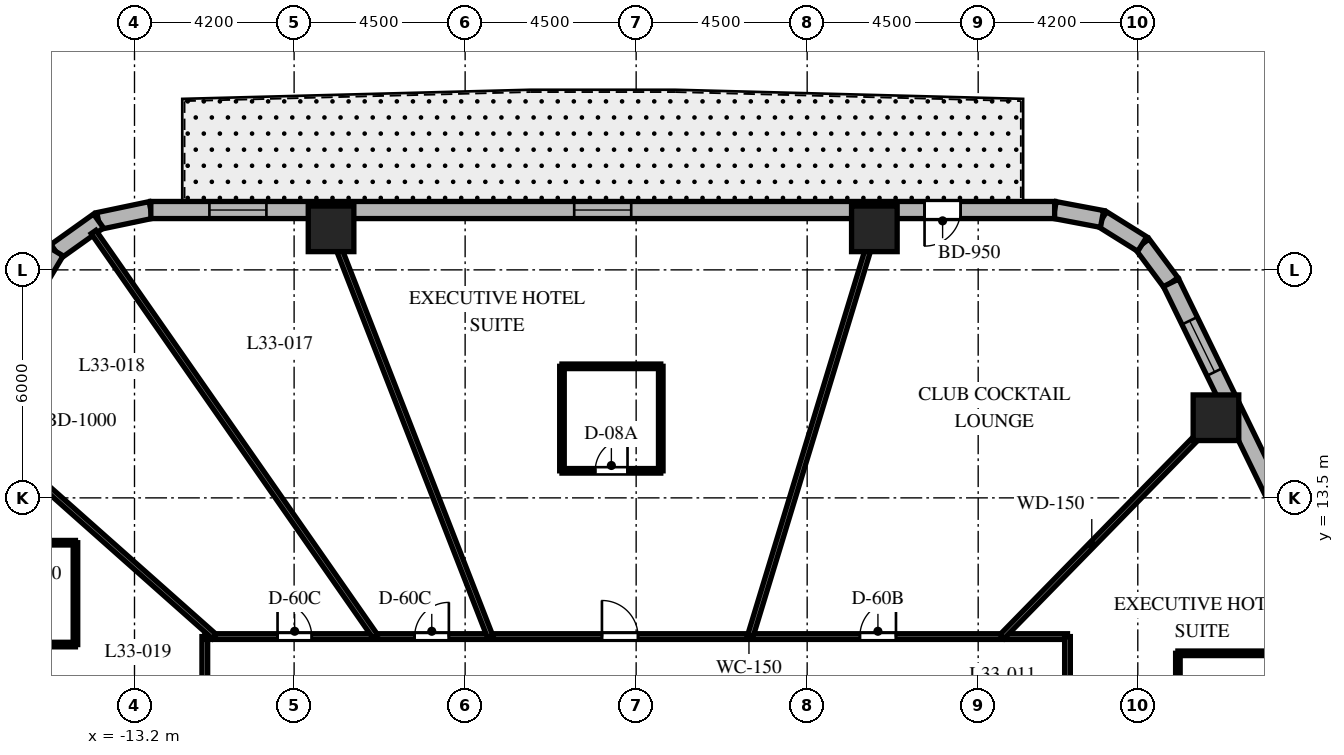
"""IFC4 building model, lengths in metres.
Left out: names, types, materials, properties, quantities, classifications, styles, units other than length and angle.
Written with IfcOpenShell. Run it as: python <this file> out.ifc"""

import sys

from ifc_helpers import new_model, si_unit, direction, frame, frame_2d, origin, origin_2d, place, context, subcontext, project, spatial, rectangle, extrude, element, fill, save


model = new_model("IFC4")
c1 = context("Model", 3, precision=1e-05, world=origin(), true_north=direction((0.0, 1.0)))
c2 = subcontext(c1, "Body", "Model", "MODEL_VIEW")
j1 = project(units=[si_unit("LENGTHUNIT", "METRE"), si_unit("PLANEANGLEUNIT", "RADIAN")], contexts=[c1])
p1 = place(None, origin())
s1 = spatial("IfcSite", under=j1, at=p1, CompositionType="ELEMENT")
p2 = place(p1, origin())
s2 = spatial("IfcBuilding", under=s1, at=p2, CompositionType="ELEMENT")
p3 = place(p2, frame((0.0, 0.0, 135.8)))
s3 = spatial("IfcBuildingStorey", under=s2, at=p3, CompositionType="ELEMENT", Elevation=135.8)
for number, where, z_axis, x_axis in (
    (1, (15.257, 15.609, 0.0), (0.0, 0.0, 1.0), (1.0, 0.0, 0.0)),
    (2, (6.268, 20.58, 0.0), (0.0, 0.0, 1.0), (1.0, 0.0, 0.0)),
    (3, (-8.028, 20.58, 0.0), (0.0, 0.0, 1.0), (1.0, 0.0, 0.0)),
):
    element("IfcColumn", number, at=place(p3, frame(where, z_axis=z_axis, x_axis=x_axis)), inside=s3, PredefinedType="COLUMN", context=c2, shape_type="SweptSolid", body=[
        extrude(rectangle(XDim=1.2, YDim=1.2, at=origin_2d()), origin(), (0.0, 0.0, 1.0), 3.7),
    ])
p4 = place(p3, frame((14.076, 19.161, 0.0), z_axis=(0.0, 0.0, 1.0), x_axis=(-0.597226657159, 0.802072515412, 0.0)))
e4 = element("IfcWall", 4, at=p4, inside=s3, PredefinedType="SOLIDWALL", context=c2, shape_type="SweptSolid", body=[
    extrude(rectangle(XDim=1.269, YDim=0.45, at=frame_2d((0.635, 0.0))), origin(), (0.0, 0.0, 1.0), 3.38),
])
p5 = place(p3, frame((13.318, 20.179, 0.0), z_axis=(0.0, 0.0, 1.0), x_axis=(-0.848031272749, 0.529946186362, 0.0)))
e5 = element("IfcWall", 5, at=p5, inside=s3, PredefinedType="SOLIDWALL", context=c2, shape_type="SweptSolid", body=[
    extrude(rectangle(XDim=1.248, YDim=0.45, at=frame_2d((0.624, 0.0))), origin(), (0.0, 0.0, 1.0), 3.38),
])
p6 = place(p3, frame((12.259, 20.84, 0.0), z_axis=(0.0, 0.0, 1.0), x_axis=(-0.982730354425, 0.185043374624, 0.0)))
e6 = element("IfcWall", 6, at=p6, inside=s3, PredefinedType="SOLIDWALL", context=c2, shape_type="SweptSolid", body=[
    extrude(rectangle(XDim=1.269, YDim=0.45, at=frame_2d((0.635, 0.0))), origin(), (0.0, 0.0, 1.0), 3.38),
])
p7 = place(p3, frame((-12.771, 21.075, 0.0), z_axis=(0.0, 0.0, 1.0), x_axis=(-0.97874281988, -0.205091424819, 0.0)))
e7 = element("IfcWall", 7, at=p7, inside=s3, PredefinedType="SOLIDWALL", context=c2, shape_type="SweptSolid", body=[
    extrude(rectangle(XDim=1.406, YDim=0.45, at=frame_2d((0.703, 0.0))), origin(), (0.0, 0.0, 1.0), 3.38),
])
p8 = place(p3, frame((-14.146, 20.787, 0.0), z_axis=(0.0, 0.0, 1.0), x_axis=(-0.814162929117, -0.580636482536, 0.0)))
e8 = element("IfcWall", 8, at=p8, inside=s3, PredefinedType="SOLIDWALL", context=c2, shape_type="SweptSolid", body=[
    extrude(rectangle(XDim=1.382, YDim=0.45, at=frame_2d((0.691, 0.0))), origin(), (0.0, 0.0, 1.0), 3.38),
])
p9 = place(p3, frame((-15.272, 19.984, 0.0), z_axis=(0.0, 0.0, 1.0), x_axis=(-0.512579347361, -0.858639862025, 0.0)))
e9 = element("IfcWall", 9, at=p9, inside=s3, PredefinedType="SOLIDWALL", context=c2, shape_type="SweptSolid", body=[
    extrude(rectangle(XDim=1.406, YDim=0.45, at=frame_2d((0.703, 0.0))), origin(), (0.0, 0.0, 1.0), 3.38),
])
p10 = place(p3, frame((22.238, 2.427, 0.0), z_axis=(0.0, 0.0, 1.0), x_axis=(-0.438374803278, 0.898792262901, 0.0)))
e10 = element("IfcWall", 10, at=p10, inside=s3, PredefinedType="SOLIDWALL", context=c2, shape_type="SweptSolid", body=[
    extrude(rectangle(XDim=18.618, YDim=0.45, at=frame_2d((9.309, 0.0))), origin(), (0.0, 0.0, 1.0), 3.38),
])
p11 = place(p10, frame((8.61, 0.0, 0.8)))
e11 = element("IfcOpeningElement", 11, at=p11, cuts=e10, PredefinedType="OPENING", context=c2, shape_type="SweptSolid", body=[
    extrude(rectangle(XDim=1.5, YDim=1.8, at=frame_2d((0.75, 0.9))), frame((0.0, 0.235, 0.0), z_axis=(0.0, -1.0, 0.0), x_axis=(1.0, 0.0, 0.0)), (0.0, 0.0, 1.0), 0.47),
])
p12 = place(p10, frame((16.006, 0.0, 0.8)))
e12 = element("IfcOpeningElement", 12, at=p12, cuts=e10, PredefinedType="OPENING", context=c2, shape_type="SweptSolid", body=[
    extrude(rectangle(XDim=1.5, YDim=1.8, at=frame_2d((0.75, 0.9))), frame((0.0, 0.235, 0.0), z_axis=(0.0, -1.0, 0.0), x_axis=(1.0, 0.0, 0.0)), (0.0, 0.0, 1.0), 0.47),
])
p13 = place(p10, frame((1.163, 0.0, 0.8)))
e13 = element("IfcOpeningElement", 13, at=p13, cuts=e10, PredefinedType="OPENING", context=c2, shape_type="SweptSolid", body=[
    extrude(rectangle(XDim=1.5, YDim=1.8, at=frame_2d((0.75, 0.9))), frame((0.0, 0.235, 0.0), z_axis=(0.0, -1.0, 0.0), x_axis=(1.0, 0.0, 0.0)), (0.0, 0.0, 1.0), 0.47),
])
p14 = place(p3, frame((11.012, 21.075, 0.0), z_axis=(0.0, 0.0, 1.0), x_axis=(-1.0, 0.0, 0.0)))
e14 = element("IfcWall", 14, at=p14, inside=s3, PredefinedType="SOLIDWALL", context=c2, shape_type="SweptSolid", body=[
    extrude(rectangle(XDim=23.782, YDim=0.45, at=frame_2d((11.891, 0.0))), origin(), (0.0, 0.0, 1.0), 3.38),
])
p15 = place(p14, frame((2.473, 0.0, 0.0)))
e15 = element("IfcOpeningElement", 15, at=p15, cuts=e14, PredefinedType="OPENING", context=c2, shape_type="SweptSolid", body=[
    extrude(rectangle(XDim=0.95, YDim=2.15, at=frame_2d((0.475, 1.075))), frame((0.0, 0.235, 0.0), z_axis=(0.0, -1.0, 0.0), x_axis=(1.0, 0.0, 0.0)), (0.0, 0.0, 1.0), 0.47),
])
p16 = place(p14, frame((11.142, 0.0, 0.8)))
e16 = element("IfcOpeningElement", 16, at=p16, cuts=e14, PredefinedType="OPENING", context=c2, shape_type="SweptSolid", body=[
    extrude(rectangle(XDim=1.5, YDim=1.8, at=frame_2d((0.75, 0.9))), frame((0.0, 0.235, 0.0), z_axis=(0.0, -1.0, 0.0), x_axis=(1.0, 0.0, 0.0)), (0.0, 0.0, 1.0), 0.47),
])
p17 = place(p14, frame((20.741, 0.0, 0.8)))
e17 = element("IfcOpeningElement", 17, at=p17, cuts=e14, PredefinedType="OPENING", context=c2, shape_type="SweptSolid", body=[
    extrude(rectangle(XDim=1.5, YDim=1.8, at=frame_2d((0.75, 0.9))), frame((0.0, 0.235, 0.0), z_axis=(0.0, -1.0, 0.0), x_axis=(1.0, 0.0, 0.0)), (0.0, 0.0, 1.0), 0.47),
])
p18 = place(p3, frame((-11.35, -9.85, 0.0), z_axis=(0.0, 0.0, 1.0), x_axis=(0.0, 1.0, 0.0)))
e18 = element("IfcWall", 18, at=p18, inside=s3, PredefinedType="PARTITIONING", context=c2, shape_type="SweptSolid", body=[
    extrude(rectangle(XDim=19.7, YDim=0.15, at=frame_2d((9.85, 0.0))), origin(), (0.0, 0.0, 1.0), 2.82),
])
p19 = place(p18, frame((16.711, 0.0, 0.0)))
e19 = element("IfcOpeningElement", 19, at=p19, cuts=e18, PredefinedType="OPENING", context=c2, shape_type="SweptSolid", body=[
    extrude(rectangle(XDim=0.95, YDim=2.03, at=frame_2d((0.475, 1.015))), frame((0.0, 0.085, 0.0), z_axis=(0.0, -1.0, 0.0), x_axis=(1.0, 0.0, 0.0)), (0.0, 0.0, 1.0), 0.17),
])
p20 = place(p18, frame((12.968, 0.0, 0.0)))
e20 = element("IfcOpeningElement", 20, at=p20, cuts=e18, PredefinedType="OPENING", context=c2, shape_type="SweptSolid", body=[
    extrude(rectangle(XDim=0.9, YDim=2.03, at=frame_2d((0.45, 1.015))), frame((0.0, 0.085, 0.0), z_axis=(0.0, -1.0, 0.0), x_axis=(1.0, 0.0, 0.0)), (0.0, 0.0, 1.0), 0.17),
])
p21 = place(p18, frame((8.836, 0.0, 0.0)))
e21 = element("IfcOpeningElement", 21, at=p21, cuts=e18, PredefinedType="OPENING", context=c2, shape_type="SweptSolid", body=[
    extrude(rectangle(XDim=0.95, YDim=2.03, at=frame_2d((0.475, 1.015))), frame((0.0, 0.085, 0.0), z_axis=(0.0, -1.0, 0.0), x_axis=(1.0, 0.0, 0.0)), (0.0, 0.0, 1.0), 0.17),
])
p22 = place(p18, frame((4.448, 0.0, 0.0)))
e22 = element("IfcOpeningElement", 22, at=p22, cuts=e18, PredefinedType="OPENING", context=c2, shape_type="SweptSolid", body=[
    extrude(rectangle(XDim=0.95, YDim=2.03, at=frame_2d((0.475, 1.015))), frame((0.0, 0.085, 0.0), z_axis=(0.0, -1.0, 0.0), x_axis=(1.0, 0.0, 0.0)), (0.0, 0.0, 1.0), 0.17),
])
p23 = place(p18, frame((1.249, 0.0, 0.0)))
e23 = element("IfcOpeningElement", 23, at=p23, cuts=e18, PredefinedType="OPENING", context=c2, shape_type="SweptSolid", body=[
    extrude(rectangle(XDim=0.9, YDim=2.03, at=frame_2d((0.45, 1.015))), frame((0.0, 0.085, 0.0), z_axis=(0.0, -1.0, 0.0), x_axis=(1.0, 0.0, 0.0)), (0.0, 0.0, 1.0), 0.17),
])
p24 = place(p3, frame((-11.35, 9.85, 0.0), z_axis=(0.0, 0.0, 1.0), x_axis=(1.0, 0.0, 0.0)))
e24 = element("IfcWall", 24, at=p24, inside=s3, PredefinedType="PARTITIONING", context=c2, shape_type="SweptSolid", body=[
    extrude(rectangle(XDim=22.7, YDim=0.15, at=frame_2d((11.35, 0.0))), origin(), (0.0, 0.0, 1.0), 2.82),
])
p25 = place(p24, frame((17.237, 0.0, 0.0)))
e25 = element("IfcOpeningElement", 25, at=p25, cuts=e24, PredefinedType="OPENING", context=c2, shape_type="SweptSolid", body=[
    extrude(rectangle(XDim=0.95, YDim=2.03, at=frame_2d((0.475, 1.015))), frame((0.0, 0.085, 0.0), z_axis=(0.0, -1.0, 0.0), x_axis=(1.0, 0.0, 0.0)), (0.0, 0.0, 1.0), 0.17),
])
p26 = place(p24, frame((10.45, 0.0, 0.0)))
e26 = element("IfcOpeningElement", 26, at=p26, cuts=e24, PredefinedType="OPENING", context=c2, shape_type="SweptSolid", body=[
    extrude(rectangle(XDim=0.95, YDim=2.03, at=frame_2d((0.475, 1.015))), frame((0.0, 0.085, 0.0), z_axis=(0.0, -1.0, 0.0), x_axis=(1.0, 0.0, 0.0)), (0.0, 0.0, 1.0), 0.17),
])
p27 = place(p24, frame((5.522, 0.0, 0.0)))
e27 = element("IfcOpeningElement", 27, at=p27, cuts=e24, PredefinedType="OPENING", context=c2, shape_type="SweptSolid", body=[
    extrude(rectangle(XDim=0.9, YDim=2.03, at=frame_2d((0.45, 1.015))), frame((0.0, 0.085, 0.0), z_axis=(0.0, -1.0, 0.0), x_axis=(1.0, 0.0, 0.0)), (0.0, 0.0, 1.0), 0.17),
])
p28 = place(p24, frame((1.914, 0.0, 0.0)))
e28 = element("IfcOpeningElement", 28, at=p28, cuts=e24, PredefinedType="OPENING", context=c2, shape_type="SweptSolid", body=[
    extrude(rectangle(XDim=0.9, YDim=2.03, at=frame_2d((0.45, 1.015))), frame((0.0, 0.085, 0.0), z_axis=(0.0, -1.0, 0.0), x_axis=(1.0, 0.0, 0.0)), (0.0, 0.0, 1.0), 0.17),
])
p29 = place(p3, frame((11.35, 9.85, 0.0), z_axis=(0.0, 0.0, 1.0), x_axis=(0.0, -1.0, 0.0)))
e29 = element("IfcWall", 29, at=p29, inside=s3, PredefinedType="PARTITIONING", context=c2, shape_type="SweptSolid", body=[
    extrude(rectangle(XDim=19.7, YDim=0.15, at=frame_2d((9.85, 0.0))), origin(), (0.0, 0.0, 1.0), 2.82),
])
p30 = place(p29, frame((3.008, 0.0, 0.0)))
e30 = element("IfcOpeningElement", 30, at=p30, cuts=e29, PredefinedType="OPENING", context=c2, shape_type="SweptSolid", body=[
    extrude(rectangle(XDim=0.95, YDim=2.03, at=frame_2d((0.475, 1.015))), frame((0.0, 0.085, 0.0), z_axis=(0.0, -1.0, 0.0), x_axis=(1.0, 0.0, 0.0)), (0.0, 0.0, 1.0), 0.17),
])
p31 = place(p29, frame((15.205, 0.0, 0.0)))
e31 = element("IfcOpeningElement", 31, at=p31, cuts=e29, PredefinedType="OPENING", context=c2, shape_type="SweptSolid", body=[
    extrude(rectangle(XDim=0.95, YDim=2.03, at=frame_2d((0.475, 1.015))), frame((0.0, 0.085, 0.0), z_axis=(0.0, -1.0, 0.0), x_axis=(1.0, 0.0, 0.0)), (0.0, 0.0, 1.0), 0.17),
])
p32 = place(p29, frame((8.836, 0.0, 0.0)))
e32 = element("IfcOpeningElement", 32, at=p32, cuts=e29, PredefinedType="OPENING", context=c2, shape_type="SweptSolid", body=[
    extrude(rectangle(XDim=0.95, YDim=2.03, at=frame_2d((0.475, 1.015))), frame((0.0, 0.085, 0.0), z_axis=(0.0, -1.0, 0.0), x_axis=(1.0, 0.0, 0.0)), (0.0, 0.0, 1.0), 0.17),
])
p33 = place(p3, frame((9.628, 9.85, 0.0), z_axis=(0.0, 0.0, 1.0), x_axis=(0.698992824326, 0.715128681805, 0.0)))
e33 = element("IfcWall", 33, at=p33, inside=s3, PredefinedType="PARTITIONING", context=c2, shape_type="SweptSolid", body=[
    extrude(rectangle(XDim=8.579, YDim=0.15, at=frame_2d((4.29, 0.0))), origin(), (0.0, 0.0, 1.0), 2.52),
])
p34 = place(p3, frame((3.0, 9.85, 0.0), z_axis=(0.0, 0.0, 1.0), x_axis=(0.291352035382, 0.95661590593, 0.0)))
e34 = element("IfcWall", 34, at=p34, inside=s3, PredefinedType="PARTITIONING", context=c2, shape_type="SweptSolid", body=[
    extrude(rectangle(XDim=11.734, YDim=0.15, at=frame_2d((5.867, 0.0))), origin(), (0.0, 0.0, 1.0), 2.52),
])
p35 = place(p3, frame((-3.842, 9.85, 0.0), z_axis=(0.0, 0.0, 1.0), x_axis=(-0.363432685593, 0.931620460833, 0.0)))
e35 = element("IfcWall", 35, at=p35, inside=s3, PredefinedType="PARTITIONING", context=c2, shape_type="SweptSolid", body=[
    extrude(rectangle(XDim=12.049, YDim=0.15, at=frame_2d((6.024, 0.0))), origin(), (0.0, 0.0, 1.0), 2.52),
])
p36 = place(p3, frame((-6.861, 9.85, 0.0), z_axis=(0.0, 0.0, 1.0), x_axis=(-0.571575431292, 0.820549527051, 0.0)))
e36 = element("IfcWall", 36, at=p36, inside=s3, PredefinedType="PARTITIONING", context=c2, shape_type="SweptSolid", body=[
    extrude(rectangle(XDim=12.975, YDim=0.15, at=frame_2d((6.488, 0.0))), origin(), (0.0, 0.0, 1.0), 2.52),
])
p37 = place(p3, frame((-11.098, 9.85, 0.0), z_axis=(0.0, 0.0, 1.0), x_axis=(-0.747904295103, 0.663806572253, 0.0)))
e37 = element("IfcWall", 37, at=p37, inside=s3, PredefinedType="PARTITIONING", context=c2, shape_type="SweptSolid", body=[
    extrude(rectangle(XDim=8.16, YDim=0.15, at=frame_2d((4.08, 0.0))), origin(), (0.0, 0.0, 1.0), 2.52),
])
p38 = place(p3, frame((16.695, 9.41, 0.0), z_axis=(0.0, 0.0, 1.0), x_axis=(-1.0, 0.0, 0.0)))
e38 = element("IfcWall", 38, at=p38, inside=s3, PredefinedType="PARTITIONING", context=c2, shape_type="SweptSolid", body=[
    extrude(rectangle(XDim=2.44, YDim=0.12, at=frame_2d((1.22, 0.0))), origin(), (0.0, 0.0, 1.0), 2.906),
])
p39 = place(p3, frame((14.255, 9.41, 0.0), z_axis=(0.0, 0.0, 1.0), x_axis=(0.0, -1.0, 0.0)))
e39 = element("IfcWall", 39, at=p39, inside=s3, PredefinedType="PARTITIONING", context=c2, shape_type="SweptSolid", body=[
    extrude(rectangle(XDim=2.61, YDim=0.12, at=frame_2d((1.305, 0.0))), origin(), (0.0, 0.0, 1.0), 3.38),
])
p40 = place(p3, frame((-1.952, 14.212, 0.0), z_axis=(0.0, 0.0, 1.0), x_axis=(1.0, 0.0, 0.0)))
e40 = element("IfcWall", 40, at=p40, inside=s3, PredefinedType="PARTITIONING", context=c2, shape_type="SweptSolid", body=[
    extrude(rectangle(XDim=2.6, YDim=0.12, at=frame_2d((1.3, 0.0))), origin(), (0.0, 0.0, 1.0), 3.38),
])
p41 = place(p40, frame((0.875, 0.0, 0.0)))
e41 = element("IfcOpeningElement", 41, at=p41, cuts=e40, PredefinedType="OPENING", context=c2, shape_type="SweptSolid", body=[
    extrude(rectangle(XDim=0.85, YDim=2.03, at=frame_2d((0.425, 1.015))), frame((0.0, 0.07, 0.0), z_axis=(0.0, -1.0, 0.0), x_axis=(1.0, 0.0, 0.0)), (0.0, 0.0, 1.0), 0.14),
])
p42 = place(p3, frame((0.648, 14.212, 0.0), z_axis=(0.0, 0.0, 1.0), x_axis=(0.0, 1.0, 0.0)))
e42 = element("IfcWall", 42, at=p42, inside=s3, PredefinedType="PARTITIONING", context=c2, shape_type="SweptSolid", body=[
    extrude(rectangle(XDim=2.75, YDim=0.12, at=frame_2d((1.375, 0.0))), origin(), (0.0, 0.0, 1.0), 2.821),
])
p43 = place(p3, frame((0.648, 16.962, 0.0), z_axis=(0.0, 0.0, 1.0), x_axis=(-1.0, 0.0, 0.0)))
e43 = element("IfcWall", 43, at=p43, inside=s3, PredefinedType="PARTITIONING", context=c2, shape_type="SweptSolid", body=[
    extrude(rectangle(XDim=2.6, YDim=0.12, at=frame_2d((1.3, 0.0))), origin(), (0.0, 0.0, 1.0), 3.38),
])
p44 = place(p3, frame((-1.952, 16.962, 0.0), z_axis=(0.0, 0.0, 1.0), x_axis=(0.0, -1.0, 0.0)))
e44 = element("IfcWall", 44, at=p44, inside=s3, PredefinedType="PARTITIONING", context=c2, shape_type="SweptSolid", body=[
    extrude(rectangle(XDim=2.75, YDim=0.12, at=frame_2d((1.375, 0.0))), origin(), (0.0, 0.0, 1.0), 2.821),
])
p45 = place(p3, frame((-17.274, 9.64, 0.0), z_axis=(0.0, 0.0, 1.0), x_axis=(1.0, 0.0, 0.0)))
e45 = element("IfcWall", 45, at=p45, inside=s3, PredefinedType="PARTITIONING", context=c2, shape_type="SweptSolid", body=[
    extrude(rectangle(XDim=2.52, YDim=0.12, at=frame_2d((1.26, 0.0))), origin(), (0.0, 0.0, 1.0), 2.952),
])
p46 = place(p45, frame((0.835, 0.0, 0.0)))
e46 = element("IfcOpeningElement", 46, at=p46, cuts=e45, PredefinedType="OPENING", context=c2, shape_type="SweptSolid", body=[
    extrude(rectangle(XDim=0.85, YDim=2.03, at=frame_2d((0.425, 1.015))), frame((0.0, 0.07, 0.0), z_axis=(0.0, -1.0, 0.0), x_axis=(1.0, 0.0, 0.0)), (0.0, 0.0, 1.0), 0.14),
])
p47 = place(p3, frame((-14.754, 9.64, 0.0), z_axis=(0.0, 0.0, 1.0), x_axis=(0.0, 1.0, 0.0)))
e47 = element("IfcWall", 47, at=p47, inside=s3, PredefinedType="PARTITIONING", context=c2, shape_type="SweptSolid", body=[
    extrude(rectangle(XDim=2.68, YDim=0.12, at=frame_2d((1.34, 0.0))), origin(), (0.0, 0.0, 1.0), 2.952),
])
p48 = place(p3, frame((-14.754, 12.32, 0.0), z_axis=(0.0, 0.0, 1.0), x_axis=(-1.0, 0.0, 0.0)))
e48 = element("IfcWall", 48, at=p48, inside=s3, PredefinedType="PARTITIONING", context=c2, shape_type="SweptSolid", body=[
    extrude(rectangle(XDim=2.52, YDim=0.12, at=frame_2d((1.26, 0.0))), origin(), (0.0, 0.0, 1.0), 3.38),
])
p49 = place(p12, origin())
e49 = element("IfcWindow", 49, at=p49, inside=s3, PartitioningType="SINGLE_PANEL", PredefinedType="WINDOW", context=c2, shape_type="SweptSolid", body=[
    extrude(rectangle(XDim=1.5, YDim=1.8, at=frame_2d((0.75, 0.9))), frame((0.0, 0.03, 0.0), z_axis=(0.0, -1.0, 0.0), x_axis=(1.0, 0.0, 0.0)), (0.0, 0.0, 1.0), 0.06),
])
fill(e12, e49)
p50 = place(p15, origin())
e50 = element("IfcDoor", 50, at=p50, inside=s3, OperationType="SINGLE_SWING_RIGHT", PredefinedType="DOOR", context=c2, shape_type="SweptSolid", body=[
    extrude(rectangle(XDim=0.95, YDim=2.15, at=frame_2d((0.475, 1.075))), frame((0.0, 0.025, 0.0), z_axis=(0.0, -1.0, 0.0), x_axis=(1.0, 0.0, 0.0)), (0.0, 0.0, 1.0), 0.05),
])
fill(e15, e50)
p51 = place(p16, origin())
e51 = element("IfcWindow", 51, at=p51, inside=s3, PartitioningType="SINGLE_PANEL", PredefinedType="WINDOW", context=c2, shape_type="SweptSolid", body=[
    extrude(rectangle(XDim=1.5, YDim=1.8, at=frame_2d((0.75, 0.9))), frame((0.0, 0.03, 0.0), z_axis=(0.0, -1.0, 0.0), x_axis=(1.0, 0.0, 0.0)), (0.0, 0.0, 1.0), 0.06),
])
fill(e16, e51)
p52 = place(p17, origin())
e52 = element("IfcWindow", 52, at=p52, inside=s3, PartitioningType="SINGLE_PANEL", PredefinedType="WINDOW", context=c2, shape_type="SweptSolid", body=[
    extrude(rectangle(XDim=1.5, YDim=1.8, at=frame_2d((0.75, 0.9))), frame((0.0, 0.03, 0.0), z_axis=(0.0, -1.0, 0.0), x_axis=(1.0, 0.0, 0.0)), (0.0, 0.0, 1.0), 0.06),
])
fill(e17, e52)
p53 = place(p25, origin())
e53 = element("IfcDoor", 53, at=p53, inside=s3, OperationType="SINGLE_SWING_RIGHT", PredefinedType="DOOR", context=c2, shape_type="SweptSolid", body=[
    extrude(rectangle(XDim=0.95, YDim=2.03, at=frame_2d((0.475, 1.015))), frame((0.0, 0.025, 0.0), z_axis=(0.0, -1.0, 0.0), x_axis=(1.0, 0.0, 0.0)), (0.0, 0.0, 1.0), 0.05),
])
fill(e25, e53)
p54 = place(p26, origin())
e54 = element("IfcDoor", 54, at=p54, inside=s3, OperationType="SINGLE_SWING_LEFT", PredefinedType="DOOR", context=c2, shape_type="SweptSolid", body=[
    extrude(rectangle(XDim=0.95, YDim=2.03, at=frame_2d((0.475, 1.015))), frame((0.0, 0.025, 0.0), z_axis=(0.0, -1.0, 0.0), x_axis=(1.0, 0.0, 0.0)), (0.0, 0.0, 1.0), 0.05),
])
fill(e26, e54)
p55 = place(p41, origin())
e55 = element("IfcDoor", 55, at=p55, inside=s3, OperationType="SINGLE_SWING_RIGHT", PredefinedType="DOOR", context=c2, shape_type="SweptSolid", body=[
    extrude(rectangle(XDim=0.85, YDim=2.03, at=frame_2d((0.425, 1.015))), frame((0.0, 0.025, 0.0), z_axis=(0.0, -1.0, 0.0), x_axis=(1.0, 0.0, 0.0)), (0.0, 0.0, 1.0), 0.05),
])
fill(e41, e55)
p56 = place(p27, origin())
e56 = element("IfcDoor", 56, at=p56, inside=s3, OperationType="SINGLE_SWING_RIGHT", PredefinedType="DOOR", context=c2, shape_type="SweptSolid", body=[
    extrude(rectangle(XDim=0.9, YDim=2.03, at=frame_2d((0.45, 1.015))), frame((0.0, 0.025, 0.0), z_axis=(0.0, -1.0, 0.0), x_axis=(1.0, 0.0, 0.0)), (0.0, 0.0, 1.0), 0.05),
])
fill(e27, e56)
p57 = place(p28, origin())
e57 = element("IfcDoor", 57, at=p57, inside=s3, OperationType="SINGLE_SWING_LEFT", PredefinedType="DOOR", context=c2, shape_type="SweptSolid", body=[
    extrude(rectangle(XDim=0.9, YDim=2.03, at=frame_2d((0.45, 1.015))), frame((0.0, 0.025, 0.0), z_axis=(0.0, -1.0, 0.0), x_axis=(1.0, 0.0, 0.0)), (0.0, 0.0, 1.0), 0.05),
])
fill(e28, e57)
save(model, sys.argv[1])
